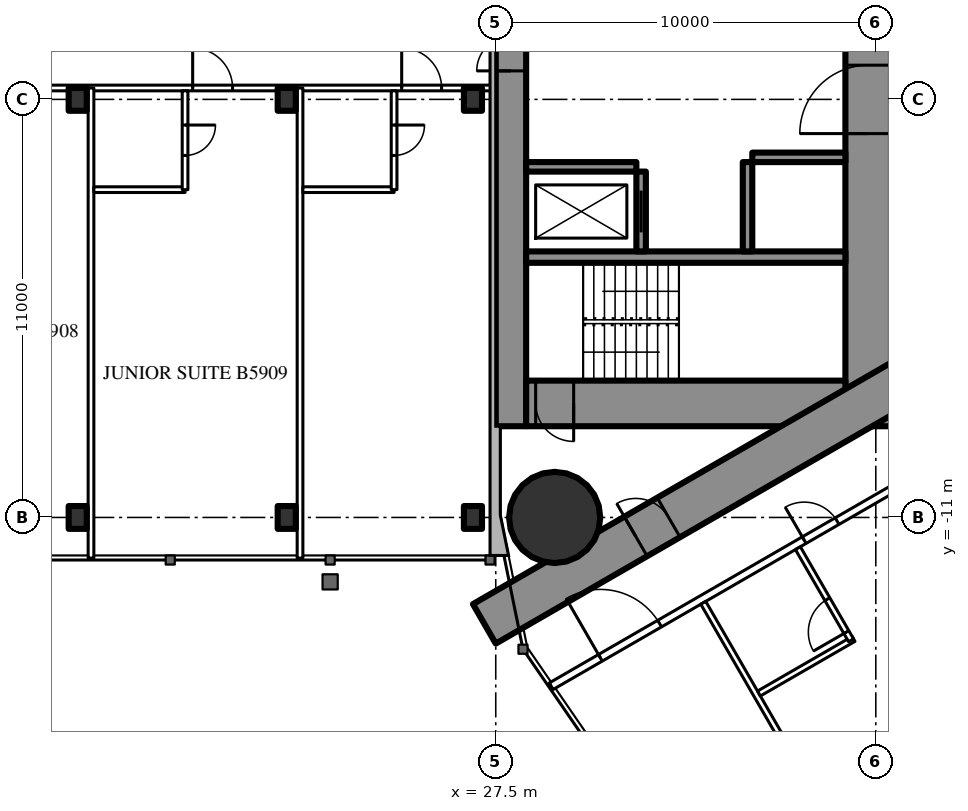
"""IFC4 building model, lengths in metres.
Left out: names, types, materials, properties, quantities, classifications, styles, units other than length and angle.
Written with IfcOpenShell. Run it as: python <this file> out.ifc"""

import sys

from ifc_helpers import new_model, si_unit, direction, frame, frame_2d, origin, origin_2d, place, context, subcontext, project, spatial, rectangle, circle, i_section, extrude, element, fill, save


model = new_model("IFC4")
c1 = context("Model", 3, precision=1e-05, world=origin(), true_north=direction((0.0, 1.0)))
c2 = subcontext(c1, "Body", "Model", "MODEL_VIEW")
j1 = project(units=[si_unit("LENGTHUNIT", "METRE"), si_unit("PLANEANGLEUNIT", "RADIAN")], contexts=[c1])
p1 = place(None, origin())
s1 = spatial("IfcSite", under=j1, at=p1, CompositionType="ELEMENT")
p2 = place(p1, origin())
s2 = spatial("IfcBuilding", under=s1, at=p2, CompositionType="ELEMENT")
p3 = place(p2, frame((0.0, 0.0, 222.5)))
s3 = spatial("IfcBuildingStorey", under=s2, at=p3, CompositionType="ELEMENT", Elevation=222.5)
p4 = place(p3, frame((29.05, -11.0, 0.0), z_axis=(0.0, 0.0, 1.0), x_axis=(1.0, 0.0, 0.0)))
e1 = element("IfcColumn", 1, at=p4, inside=s3, PredefinedType="COLUMN", context=c2, shape_type="SweptSolid", body=[
    extrude(circle(Radius=1.2, at=origin_2d()), origin(), (0.0, 0.0, 1.0), 3.6),
])
p5 = place(p3, frame((27.9, -8.6, 0.0), z_axis=(0.0, 0.0, 1.0), x_axis=(0.0, 1.0, 0.0)))
e2 = element("IfcWall", 2, at=p5, inside=s3, PredefinedType="SHEAR", context=c2, shape_type="SweptSolid", body=[
    extrude(rectangle(XDim=17.2, YDim=0.8, at=frame_2d((8.6, 0.0))), origin(), (0.0, 0.0, 1.0), 3.6),
])
p6 = place(p5, frame((9.35, 0.0, 0.0)))
e3 = element("IfcOpeningElement", 3, at=p6, cuts=e2, PredefinedType="OPENING", context=c2, shape_type="SweptSolid", body=[
    extrude(rectangle(XDim=0.9, YDim=2.2, at=frame_2d((0.45, 1.1))), frame((0.0, 0.41, 0.0), z_axis=(0.0, -1.0, 0.0), x_axis=(1.0, 0.0, 0.0)), (0.0, 0.0, 1.0), 0.82),
])
p7 = place(p3, frame((37.3, -8.6, 0.0), z_axis=(0.0, 0.0, 1.0), x_axis=(0.0, 1.0, 0.0)))
e4 = element("IfcWall", 4, at=p7, inside=s3, PredefinedType="SHEAR", context=c2, shape_type="SweptSolid", body=[
    extrude(rectangle(XDim=17.2, YDim=1.2, at=frame_2d((8.6, 0.0))), origin(), (0.0, 0.0, 1.0), 3.6),
])
p8 = place(p7, frame((7.7, 0.0, 0.0)))
e5 = element("IfcOpeningElement", 5, at=p8, cuts=e4, PredefinedType="OPENING", context=c2, shape_type="SweptSolid", body=[
    extrude(rectangle(XDim=1.8, YDim=2.2, at=frame_2d((0.9, 1.1))), frame((0.0, 0.61, 0.0), z_axis=(0.0, -1.0, 0.0), x_axis=(1.0, 0.0, 0.0)), (0.0, 0.0, 1.0), 1.22),
])
p9 = place(p3, frame((28.3, -8.0, 0.0), z_axis=(0.0, 0.0, 1.0), x_axis=(1.0, 0.0, 0.0)))
e6 = element("IfcWall", 6, at=p9, inside=s3, PredefinedType="SHEAR", context=c2, shape_type="SweptSolid", body=[
    extrude(rectangle(XDim=8.4, YDim=1.2, at=frame_2d((4.2, 0.0))), origin(), (0.0, 0.0, 1.0), 3.6),
])
p10 = place(p9, frame((0.25, 0.0, 0.0)))
e7 = element("IfcOpeningElement", 7, at=p10, cuts=e6, PredefinedType="OPENING", context=c2, shape_type="SweptSolid", body=[
    extrude(rectangle(XDim=1.0, YDim=2.2, at=frame_2d((0.5, 1.1))), frame((0.0, 0.61, 0.0), z_axis=(0.0, -1.0, 0.0), x_axis=(1.0, 0.0, 0.0)), (0.0, 0.0, 1.0), 1.22),
])
p11 = place(p3, frame((28.3, -4.15, 0.0), z_axis=(0.0, 0.0, 1.0), x_axis=(1.0, 0.0, 0.0)))
e8 = element("IfcWall", 8, at=p11, inside=s3, PredefinedType="SHEAR", context=c2, shape_type="SweptSolid", body=[
    extrude(rectangle(XDim=8.4, YDim=0.3, at=frame_2d((4.2, 0.0))), origin(), (0.0, 0.0, 1.0), 3.6),
])
p12 = place(p3, frame((31.325, -4.0, 0.0), z_axis=(0.0, 0.0, 1.0), x_axis=(0.0, 1.0, 0.0)))
e9 = element("IfcWall", 9, at=p12, inside=s3, PredefinedType="SHEAR", context=c2, shape_type="SweptSolid", body=[
    extrude(rectangle(XDim=2.1, YDim=0.25, at=frame_2d((1.05, 0.0))), origin(), (0.0, 0.0, 1.0), 3.6),
])
p13 = place(p12, frame((0.5, 0.0, 0.0)))
e10 = element("IfcOpeningElement", 10, at=p13, cuts=e9, PredefinedType="OPENING", context=c2, shape_type="SweptSolid", body=[
    extrude(rectangle(XDim=1.1, YDim=2.2, at=frame_2d((0.55, 1.1))), frame((0.0, 0.135, 0.0), z_axis=(0.0, -1.0, 0.0), x_axis=(1.0, 0.0, 0.0)), (0.0, 0.0, 1.0), 0.27),
])
p14 = place(p3, frame((34.125, -4.0, 0.0), z_axis=(0.0, 0.0, 1.0), x_axis=(0.0, 1.0, 0.0)))
e11 = element("IfcWall", 11, at=p14, inside=s3, PredefinedType="SHEAR", context=c2, shape_type="SweptSolid", body=[
    extrude(rectangle(XDim=2.35, YDim=0.25, at=frame_2d((1.175, 0.0))), origin(), (0.0, 0.0, 1.0), 3.6),
])
p15 = place(p3, frame((28.3, -1.775, 0.0), z_axis=(0.0, 0.0, 1.0), x_axis=(1.0, 0.0, 0.0)))
e12 = element("IfcWall", 12, at=p15, inside=s3, PredefinedType="SHEAR", context=c2, shape_type="SweptSolid", body=[
    extrude(rectangle(XDim=2.9, YDim=0.25, at=frame_2d((1.45, 0.0))), origin(), (0.0, 0.0, 1.0), 3.6),
])
p16 = place(p3, frame((34.25, -1.525, 0.0), z_axis=(0.0, 0.0, 1.0), x_axis=(1.0, 0.0, 0.0)))
e13 = element("IfcWall", 13, at=p16, inside=s3, PredefinedType="SHEAR", context=c2, shape_type="SweptSolid", body=[
    extrude(rectangle(XDim=2.45, YDim=0.25, at=frame_2d((1.225, 0.0))), origin(), (0.0, 0.0, 1.0), 3.6),
])
p17 = place(p3, frame((27.2, -13.8, 0.0), z_axis=(0.0, 0.0, 1.0), x_axis=(0.866027159892, 0.499996958321, 0.0)))
e14 = element("IfcWall", 14, at=p17, inside=s3, PredefinedType="SHEAR", context=c2, shape_type="SweptSolid", body=[
    extrude(rectangle(XDim=27.947, YDim=1.2, at=frame_2d((13.973, 0.0))), origin(), (0.0, 0.0, 1.0), 3.6),
])
p18 = place(p17, frame((4.6, 0.0, 0.0)))
e15 = element("IfcOpeningElement", 15, at=p18, cuts=e14, PredefinedType="OPENING", context=c2, shape_type="SweptSolid", body=[
    extrude(rectangle(XDim=1.0, YDim=2.2, at=frame_2d((0.5, 1.1))), frame((0.0, 0.61, 0.0), z_axis=(0.0, -1.0, 0.0), x_axis=(1.0, 0.0, 0.0)), (0.0, 0.0, 1.0), 1.22),
])
p19 = place(p17, frame((13.395, 0.0, 0.0)))
e16 = element("IfcOpeningElement", 16, at=p19, cuts=e14, PredefinedType="OPENING", context=c2, shape_type="SweptSolid", body=[
    extrude(rectangle(XDim=1.8, YDim=2.2, at=frame_2d((0.9, 1.1))), frame((0.0, 0.61, 0.0), z_axis=(0.0, -1.0, 0.0), x_axis=(1.0, 0.0, 0.0)), (0.0, 0.0, 1.0), 1.22),
])
p20 = place(p3, frame((27.2, 13.8, 0.0), z_axis=(0.0, 0.0, 1.0), x_axis=(0.866024515034, -0.500001539357, 0.0)))
e17 = element("IfcWall", 17, at=p20, inside=s3, PredefinedType="SHEAR", context=c2, shape_type="SweptSolid", body=[
    extrude(rectangle(XDim=26.907, YDim=1.2, at=frame_2d((13.454, 0.0))), origin(), (0.0, 0.0, 1.0), 3.6),
])
p21 = place(p20, frame((4.6, 0.0, 0.0)))
e18 = element("IfcOpeningElement", 18, at=p21, cuts=e17, PredefinedType="OPENING", context=c2, shape_type="SweptSolid", body=[
    extrude(rectangle(XDim=1.0, YDim=2.2, at=frame_2d((0.5, 1.1))), frame((0.0, 0.61, 0.0), z_axis=(0.0, -1.0, 0.0), x_axis=(1.0, 0.0, 0.0)), (0.0, 0.0, 1.0), 1.22),
])
p22 = place(p20, frame((13.395, 0.0, 0.0)))
e19 = element("IfcOpeningElement", 19, at=p22, cuts=e17, PredefinedType="OPENING", context=c2, shape_type="SweptSolid", body=[
    extrude(rectangle(XDim=1.8, YDim=2.2, at=frame_2d((0.9, 1.1))), frame((0.0, 0.61, 0.0), z_axis=(0.0, -1.0, 0.0), x_axis=(1.0, 0.0, 0.0)), (0.0, 0.0, 1.0), 1.22),
])
for number, where, z_axis, x_axis in (
    (20, (16.5, -11.0, 0.0), (0.0, 0.0, 1.0), (1.0, 0.0, 0.0)),
    (21, (22.0, -11.0, 0.0), (0.0, 0.0, 1.0), (1.0, 0.0, 0.0)),
    (22, (26.9, -11.0, 0.0), (0.0, 0.0, 1.0), (1.0, 0.0, 0.0)),
    (23, (16.5, 0.0, 0.0), (0.0, 0.0, 1.0), (1.0, 0.0, 0.0)),
    (24, (22.0, 0.0, 0.0), (0.0, 0.0, 1.0), (1.0, 0.0, 0.0)),
    (25, (26.9, 0.0, 0.0), (0.0, 0.0, 1.0), (1.0, 0.0, 0.0)),
):
    element("IfcColumn", number, at=place(p3, frame(where, z_axis=z_axis, x_axis=x_axis)), inside=s3, PredefinedType="COLUMN", context=c2, shape_type="SweptSolid", body=[
        extrude(i_section(OverallWidth=0.476, OverallDepth=0.6, WebThickness=0.1, FlangeThickness=0.14, FilletRadius=0.02, at=origin_2d()), origin(), (0.0, 0.0, 1.0), 3.6),
    ])
p23 = place(p3, frame((28.959, -15.44, 0.0), z_axis=(0.0, 0.0, 1.0), x_axis=(0.866025227435, 0.500000305447, 0.0)))
e26 = element("IfcWall", 26, at=p23, inside=s3, PredefinedType="PARTITIONING", context=c2, shape_type="SweptSolid", body=[
    extrude(rectangle(XDim=30.88, YDim=0.2, at=frame_2d((15.44, 0.0))), origin(), (0.0, 0.0, 1.0), 3.35),
])
p24 = place(p23, frame((1.494, 0.0, 0.0)))
e27 = element("IfcOpeningElement", 27, at=p24, cuts=e26, PredefinedType="OPENING", context=c2, shape_type="SweptSolid", body=[
    extrude(rectangle(XDim=1.8, YDim=2.03, at=frame_2d((0.9, 1.015))), frame((0.0, 0.11, 0.0), z_axis=(0.0, -1.0, 0.0), x_axis=(1.0, 0.0, 0.0)), (0.0, 0.0, 1.0), 0.22),
])
p25 = place(p23, frame((7.687, 0.0, 0.0)))
e28 = element("IfcOpeningElement", 28, at=p25, cuts=e26, PredefinedType="OPENING", context=c2, shape_type="SweptSolid", body=[
    extrude(rectangle(XDim=1.0, YDim=2.2, at=frame_2d((0.5, 1.1))), frame((0.0, 0.11, 0.0), z_axis=(0.0, -1.0, 0.0), x_axis=(1.0, 0.0, 0.0)), (0.0, 0.0, 1.0), 0.22),
])
p26 = place(p23, frame((16.137, 0.0, 0.0)))
e29 = element("IfcOpeningElement", 29, at=p26, cuts=e26, PredefinedType="OPENING", context=c2, shape_type="SweptSolid", body=[
    extrude(rectangle(XDim=0.95, YDim=2.2, at=frame_2d((0.475, 1.1))), frame((0.0, 0.11, 0.0), z_axis=(0.0, -1.0, 0.0), x_axis=(1.0, 0.0, 0.0)), (0.0, 0.0, 1.0), 0.22),
])
p27 = place(p23, frame((20.021, 0.0, 0.0)))
e30 = element("IfcOpeningElement", 30, at=p27, cuts=e26, PredefinedType="OPENING", context=c2, shape_type="SweptSolid", body=[
    extrude(rectangle(XDim=0.95, YDim=2.2, at=frame_2d((0.475, 1.1))), frame((0.0, 0.11, 0.0), z_axis=(0.0, -1.0, 0.0), x_axis=(1.0, 0.0, 0.0)), (0.0, 0.0, 1.0), 0.22),
])
p28 = place(p23, frame((26.253, 0.0, 0.0)))
e31 = element("IfcOpeningElement", 31, at=p28, cuts=e26, PredefinedType="OPENING", context=c2, shape_type="SweptSolid", body=[
    extrude(rectangle(XDim=0.95, YDim=2.2, at=frame_2d((0.475, 1.1))), frame((0.0, 0.11, 0.0), z_axis=(0.0, -1.0, 0.0), x_axis=(1.0, 0.0, 0.0)), (0.0, 0.0, 1.0), 0.22),
])
p29 = place(p3, frame((32.96, -13.246, 0.0), z_axis=(0.0, 0.0, 1.0), x_axis=(0.500000236886, -0.866025267018, 0.0)))
e32 = element("IfcWall", 32, at=p29, inside=s3, PredefinedType="PARTITIONING", context=c2, shape_type="SweptSolid", body=[
    extrude(rectangle(XDim=7.583, YDim=0.15, at=frame_2d((3.791, 0.0))), origin(), (0.0, 0.0, 1.0), 3.35),
])
p30 = place(p3, frame((34.425, -15.633, 0.0), z_axis=(0.0, 0.0, 1.0), x_axis=(0.866018712932, 0.500011588718, 0.0)))
e33 = element("IfcWall", 33, at=p30, inside=s3, PredefinedType="PARTITIONING", context=c2, shape_type="SweptSolid", body=[
    extrude(rectangle(XDim=2.875, YDim=0.15, at=frame_2d((1.438, 0.0))), origin(), (0.0, 0.0, 1.0), 3.35),
])
p31 = place(p3, frame((35.45, -11.808, 0.0), z_axis=(0.0, 0.0, 1.0), x_axis=(0.49994636267, -0.866056369097, 0.0)))
e34 = element("IfcWall", 34, at=p31, inside=s3, PredefinedType="PARTITIONING", context=c2, shape_type="SweptSolid", body=[
    extrude(rectangle(XDim=2.8, YDim=0.15, at=frame_2d((1.4, 0.0))), origin(), (0.0, 0.0, 1.0), 3.35),
])
p32 = place(p31, frame((1.55, 0.0, 0.0)))
e35 = element("IfcOpeningElement", 35, at=p32, cuts=e34, PredefinedType="OPENING", context=c2, shape_type="SweptSolid", body=[
    extrude(rectangle(XDim=1.0, YDim=2.2, at=frame_2d((0.5, 1.1))), frame((0.0, 0.085, 0.0), z_axis=(0.0, -1.0, 0.0), x_axis=(1.0, 0.0, 0.0)), (0.0, 0.0, 1.0), 0.17),
])
p33 = place(p3, frame((-27.5, 0.3, 0.0), z_axis=(0.0, 0.0, 1.0), x_axis=(1.0, 0.0, 0.0)))
e36 = element("IfcWall", 36, at=p33, inside=s3, PredefinedType="PARTITIONING", context=c2, shape_type="SweptSolid", body=[
    extrude(rectangle(XDim=55.0, YDim=0.15, at=frame_2d((27.5, 0.0))), origin(), (0.0, 0.0, 1.0), 2.4),
])
p34 = place(p33, frame((1.575, 0.0, 0.0)))
e37 = element("IfcOpeningElement", 37, at=p34, cuts=e36, PredefinedType="OPENING", context=c2, shape_type="SweptSolid", body=[
    extrude(rectangle(XDim=1.0, YDim=2.2, at=frame_2d((0.5, 1.1))), frame((0.0, 0.085, 0.0), z_axis=(0.0, -1.0, 0.0), x_axis=(1.0, 0.0, 0.0)), (0.0, 0.0, 1.0), 0.17),
])
p35 = place(p33, frame((8.525, 0.0, 0.0)))
e38 = element("IfcOpeningElement", 38, at=p35, cuts=e36, PredefinedType="OPENING", context=c2, shape_type="SweptSolid", body=[
    extrude(rectangle(XDim=1.05, YDim=2.4, at=frame_2d((0.525, 1.2))), frame((0.0, 0.085, 0.0), z_axis=(0.0, -1.0, 0.0), x_axis=(1.0, 0.0, 0.0)), (0.0, 0.0, 1.0), 0.17),
])
p36 = place(p33, frame((14.025, 0.0, 0.0)))
e39 = element("IfcOpeningElement", 39, at=p36, cuts=e36, PredefinedType="OPENING", context=c2, shape_type="SweptSolid", body=[
    extrude(rectangle(XDim=1.05, YDim=2.4, at=frame_2d((0.525, 1.2))), frame((0.0, 0.085, 0.0), z_axis=(0.0, -1.0, 0.0), x_axis=(1.0, 0.0, 0.0)), (0.0, 0.0, 1.0), 0.17),
])
p37 = place(p33, frame((19.525, 0.0, 0.0)))
e40 = element("IfcOpeningElement", 40, at=p37, cuts=e36, PredefinedType="OPENING", context=c2, shape_type="SweptSolid", body=[
    extrude(rectangle(XDim=1.05, YDim=2.4, at=frame_2d((0.525, 1.2))), frame((0.0, 0.085, 0.0), z_axis=(0.0, -1.0, 0.0), x_axis=(1.0, 0.0, 0.0)), (0.0, 0.0, 1.0), 0.17),
])
p38 = place(p33, frame((25.025, 0.0, 0.0)))
e41 = element("IfcOpeningElement", 41, at=p38, cuts=e36, PredefinedType="OPENING", context=c2, shape_type="SweptSolid", body=[
    extrude(rectangle(XDim=1.05, YDim=2.4, at=frame_2d((0.525, 1.2))), frame((0.0, 0.085, 0.0), z_axis=(0.0, -1.0, 0.0), x_axis=(1.0, 0.0, 0.0)), (0.0, 0.0, 1.0), 0.17),
])
p39 = place(p33, frame((30.525, 0.0, 0.0)))
e42 = element("IfcOpeningElement", 42, at=p39, cuts=e36, PredefinedType="OPENING", context=c2, shape_type="SweptSolid", body=[
    extrude(rectangle(XDim=1.05, YDim=2.4, at=frame_2d((0.525, 1.2))), frame((0.0, 0.085, 0.0), z_axis=(0.0, -1.0, 0.0), x_axis=(1.0, 0.0, 0.0)), (0.0, 0.0, 1.0), 0.17),
])
p40 = place(p33, frame((36.025, 0.0, 0.0)))
e43 = element("IfcOpeningElement", 43, at=p40, cuts=e36, PredefinedType="OPENING", context=c2, shape_type="SweptSolid", body=[
    extrude(rectangle(XDim=1.05, YDim=2.4, at=frame_2d((0.525, 1.2))), frame((0.0, 0.085, 0.0), z_axis=(0.0, -1.0, 0.0), x_axis=(1.0, 0.0, 0.0)), (0.0, 0.0, 1.0), 0.17),
])
p41 = place(p33, frame((41.525, 0.0, 0.0)))
e44 = element("IfcOpeningElement", 44, at=p41, cuts=e36, PredefinedType="OPENING", context=c2, shape_type="SweptSolid", body=[
    extrude(rectangle(XDim=1.05, YDim=2.4, at=frame_2d((0.525, 1.2))), frame((0.0, 0.085, 0.0), z_axis=(0.0, -1.0, 0.0), x_axis=(1.0, 0.0, 0.0)), (0.0, 0.0, 1.0), 0.17),
])
p42 = place(p33, frame((47.025, 0.0, 0.0)))
e45 = element("IfcOpeningElement", 45, at=p42, cuts=e36, PredefinedType="OPENING", context=c2, shape_type="SweptSolid", body=[
    extrude(rectangle(XDim=1.05, YDim=2.4, at=frame_2d((0.525, 1.2))), frame((0.0, 0.085, 0.0), z_axis=(0.0, -1.0, 0.0), x_axis=(1.0, 0.0, 0.0)), (0.0, 0.0, 1.0), 0.17),
])
p43 = place(p33, frame((52.525, 0.0, 0.0)))
e46 = element("IfcOpeningElement", 46, at=p43, cuts=e36, PredefinedType="OPENING", context=c2, shape_type="SweptSolid", body=[
    extrude(rectangle(XDim=1.05, YDim=2.4, at=frame_2d((0.525, 1.2))), frame((0.0, 0.085, 0.0), z_axis=(0.0, -1.0, 0.0), x_axis=(1.0, 0.0, 0.0)), (0.0, 0.0, 1.0), 0.17),
])
for number, where, z_axis, x_axis in (
    (47, (16.85, -12.07, 0.0), (0.0, 0.0, 1.0), (0.0, 1.0, 0.0)),
    (48, (22.35, -12.07, 0.0), (0.0, 0.0, 1.0), (0.0, 1.0, 0.0)),
):
    element("IfcWall", number, at=place(p3, frame(where, z_axis=z_axis, x_axis=x_axis)), inside=s3, PredefinedType="PARTITIONING", context=c2, shape_type="SweptSolid", body=[
        extrude(rectangle(XDim=12.37, YDim=0.15, at=frame_2d((6.185, 0.0))), origin(), (0.0, 0.0, 1.0), 3.4),
    ])
p44 = place(p3, frame((16.925, -2.375, 0.0), z_axis=(0.0, 0.0, 1.0), x_axis=(1.0, 0.0, 0.0)))
e49 = element("IfcWall", 49, at=p44, inside=s3, PredefinedType="PARTITIONING", context=c2, shape_type="SweptSolid", body=[
    extrude(rectangle(XDim=2.4, YDim=0.15, at=frame_2d((1.2, 0.0))), origin(), (0.0, 0.0, 1.0), 3.4),
])
p45 = place(p3, frame((19.325, -2.375, 0.0), z_axis=(0.0, 0.0, 1.0), x_axis=(0.0, 1.0, 0.0)))
e50 = element("IfcWall", 50, at=p45, inside=s3, PredefinedType="PARTITIONING", context=c2, shape_type="SweptSolid", body=[
    extrude(rectangle(XDim=2.6, YDim=0.15, at=frame_2d((1.3, 0.0))), origin(), (0.0, 0.0, 1.0), 3.4),
])
p46 = place(p45, frame((0.9, 0.0, 0.0)))
e51 = element("IfcOpeningElement", 51, at=p46, cuts=e50, PredefinedType="OPENING", context=c2, shape_type="SweptSolid", body=[
    extrude(rectangle(XDim=0.8, YDim=2.2, at=frame_2d((0.4, 1.1))), frame((0.0, 0.085, 0.0), z_axis=(0.0, -1.0, 0.0), x_axis=(1.0, 0.0, 0.0)), (0.0, 0.0, 1.0), 0.17),
])
p47 = place(p3, frame((22.425, -2.375, 0.0), z_axis=(0.0, 0.0, 1.0), x_axis=(1.0, 0.0, 0.0)))
e52 = element("IfcWall", 52, at=p47, inside=s3, PredefinedType="PARTITIONING", context=c2, shape_type="SweptSolid", body=[
    extrude(rectangle(XDim=2.4, YDim=0.15, at=frame_2d((1.2, 0.0))), origin(), (0.0, 0.0, 1.0), 3.4),
])
p48 = place(p3, frame((24.825, -2.375, 0.0), z_axis=(0.0, 0.0, 1.0), x_axis=(0.0, 1.0, 0.0)))
e53 = element("IfcWall", 53, at=p48, inside=s3, PredefinedType="PARTITIONING", context=c2, shape_type="SweptSolid", body=[
    extrude(rectangle(XDim=2.6, YDim=0.15, at=frame_2d((1.3, 0.0))), origin(), (0.0, 0.0, 1.0), 3.4),
])
p49 = place(p48, frame((0.9, 0.0, 0.0)))
e54 = element("IfcOpeningElement", 54, at=p49, cuts=e53, PredefinedType="OPENING", context=c2, shape_type="SweptSolid", body=[
    extrude(rectangle(XDim=0.8, YDim=2.2, at=frame_2d((0.4, 1.1))), frame((0.0, 0.085, 0.0), z_axis=(0.0, -1.0, 0.0), x_axis=(1.0, 0.0, 0.0)), (0.0, 0.0, 1.0), 0.17),
])
p50 = place(p24, origin())
e55 = element("IfcDoor", 55, at=p50, inside=s3, OperationType="DOUBLE_DOOR_SINGLE_SWING", PredefinedType="DOOR", context=c2, shape_type="SweptSolid", body=[
    extrude(rectangle(XDim=1.8, YDim=2.03, at=frame_2d((0.9, 1.015))), frame((0.0, 0.025, 0.0), z_axis=(0.0, -1.0, 0.0), x_axis=(1.0, 0.0, 0.0)), (0.0, 0.0, 1.0), 0.05),
])
fill(e27, e55)
p51 = place(p32, origin())
e56 = element("IfcDoor", 56, at=p51, inside=s3, OperationType="SINGLE_SWING_RIGHT", PredefinedType="DOOR", context=c2, shape_type="SweptSolid", body=[
    extrude(rectangle(XDim=1.0, YDim=2.2, at=frame_2d((0.5, 1.1))), frame((0.0, 0.025, 0.0), z_axis=(0.0, -1.0, 0.0), x_axis=(1.0, 0.0, 0.0)), (0.0, 0.0, 1.0), 0.05),
])
fill(e35, e56)
p52 = place(p25, origin())
e57 = element("IfcDoor", 57, at=p52, inside=s3, OperationType="SINGLE_SWING_LEFT", PredefinedType="DOOR", context=c2, shape_type="SweptSolid", body=[
    extrude(rectangle(XDim=1.0, YDim=2.2, at=frame_2d((0.5, 1.1))), frame((0.0, 0.025, 0.0), z_axis=(0.0, -1.0, 0.0), x_axis=(1.0, 0.0, 0.0)), (0.0, 0.0, 1.0), 0.05),
])
fill(e28, e57)
p53 = place(p18, origin())
e58 = element("IfcDoor", 58, at=p53, inside=s3, OperationType="SINGLE_SWING_LEFT", PredefinedType="DOOR", context=c2, shape_type="SweptSolid", body=[
    extrude(rectangle(XDim=1.0, YDim=2.2, at=frame_2d((0.5, 1.1))), frame((0.0, 0.025, 0.0), z_axis=(0.0, -1.0, 0.0), x_axis=(1.0, 0.0, 0.0)), (0.0, 0.0, 1.0), 0.05),
])
fill(e15, e58)
p54 = place(p8, origin())
e59 = element("IfcDoor", 59, at=p54, inside=s3, OperationType="DOUBLE_DOOR_SINGLE_SWING", PredefinedType="DOOR", context=c2, shape_type="SweptSolid", body=[
    extrude(rectangle(XDim=1.8, YDim=2.2, at=frame_2d((0.9, 1.1))), frame((0.0, 0.025, 0.0), z_axis=(0.0, -1.0, 0.0), x_axis=(1.0, 0.0, 0.0)), (0.0, 0.0, 1.0), 0.05),
])
fill(e5, e59)
p55 = place(p10, origin())
e60 = element("IfcDoor", 60, at=p55, inside=s3, OperationType="SINGLE_SWING_RIGHT", PredefinedType="DOOR", context=c2, shape_type="SweptSolid", body=[
    extrude(rectangle(XDim=1.0, YDim=2.2, at=frame_2d((0.5, 1.1))), frame((0.0, 0.025, 0.0), z_axis=(0.0, -1.0, 0.0), x_axis=(1.0, 0.0, 0.0)), (0.0, 0.0, 1.0), 0.05),
])
fill(e7, e60)
p56 = place(p6, origin())
e61 = element("IfcDoor", 61, at=p56, inside=s3, OperationType="SINGLE_SWING_LEFT", PredefinedType="DOOR", context=c2, shape_type="SweptSolid", body=[
    extrude(rectangle(XDim=0.9, YDim=2.2, at=frame_2d((0.45, 1.1))), frame((0.0, 0.025, 0.0), z_axis=(0.0, -1.0, 0.0), x_axis=(1.0, 0.0, 0.0)), (0.0, 0.0, 1.0), 0.05),
])
fill(e3, e61)
p57 = place(p46, origin())
e62 = element("IfcDoor", 62, at=p57, inside=s3, OperationType="SINGLE_SWING_RIGHT", PredefinedType="DOOR", context=c2, shape_type="SweptSolid", body=[
    extrude(rectangle(XDim=0.8, YDim=2.2, at=frame_2d((0.4, 1.1))), frame((0.0, 0.025, 0.0), z_axis=(0.0, -1.0, 0.0), x_axis=(1.0, 0.0, 0.0)), (0.0, 0.0, 1.0), 0.05),
])
fill(e51, e62)
p58 = place(p42, origin())
e63 = element("IfcDoor", 63, at=p58, inside=s3, OperationType="SINGLE_SWING_LEFT", PredefinedType="DOOR", context=c2, shape_type="SweptSolid", body=[
    extrude(rectangle(XDim=1.05, YDim=2.4, at=frame_2d((0.525, 1.2))), frame((0.0, 0.025, 0.0), z_axis=(0.0, -1.0, 0.0), x_axis=(1.0, 0.0, 0.0)), (0.0, 0.0, 1.0), 0.05),
])
fill(e45, e63)
p59 = place(p49, origin())
e64 = element("IfcDoor", 64, at=p59, inside=s3, OperationType="SINGLE_SWING_RIGHT", PredefinedType="DOOR", context=c2, shape_type="SweptSolid", body=[
    extrude(rectangle(XDim=0.8, YDim=2.2, at=frame_2d((0.4, 1.1))), frame((0.0, 0.025, 0.0), z_axis=(0.0, -1.0, 0.0), x_axis=(1.0, 0.0, 0.0)), (0.0, 0.0, 1.0), 0.05),
])
fill(e54, e64)
p60 = place(p43, origin())
e65 = element("IfcDoor", 65, at=p60, inside=s3, OperationType="SINGLE_SWING_LEFT", PredefinedType="DOOR", context=c2, shape_type="SweptSolid", body=[
    extrude(rectangle(XDim=1.05, YDim=2.4, at=frame_2d((0.525, 1.2))), frame((0.0, 0.025, 0.0), z_axis=(0.0, -1.0, 0.0), x_axis=(1.0, 0.0, 0.0)), (0.0, 0.0, 1.0), 0.05),
])
fill(e46, e65)
p61 = place(p13, origin())
e66 = element("IfcDoor", 66, at=p61, inside=s3, OperationType="SLIDING_TO_LEFT", PredefinedType="USERDEFINED", context=c2, shape_type="SweptSolid", body=[
    extrude(rectangle(XDim=1.1, YDim=2.2, at=frame_2d((0.55, 1.1))), frame((0.0, 0.025, 0.0), z_axis=(0.0, -1.0, 0.0), x_axis=(1.0, 0.0, 0.0)), (0.0, 0.0, 1.0), 0.05),
])
fill(e10, e66)
save(model, sys.argv[1])
